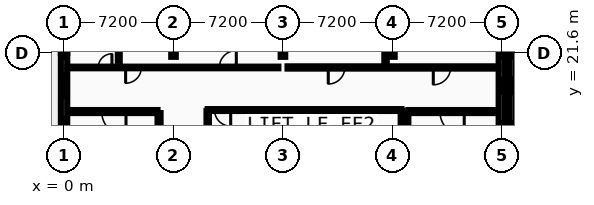
"""IFC4 building model, lengths in metres.
Left out: names, types, materials, properties, quantities, classifications, styles, units other than length and angle.
Written with IfcOpenShell. Run it as: python <this file> out.ifc"""

import sys

from ifc_helpers import new_model, si_unit, direction, frame, frame_2d, origin, origin_2d, place, context, subcontext, project, spatial, rectangle, i_section, extrude, element, fill, save


model = new_model("IFC4")
c1 = context("Model", 3, precision=1e-05, world=origin(), true_north=direction((0.0, 1.0)))
c2 = subcontext(c1, "Body", "Model", "MODEL_VIEW")
j1 = project(units=[si_unit("LENGTHUNIT", "METRE"), si_unit("PLANEANGLEUNIT", "RADIAN")], contexts=[c1])
p1 = place(None, origin())
s1 = spatial("IfcSite", under=j1, at=p1, CompositionType="ELEMENT")
p2 = place(p1, origin())
s2 = spatial("IfcBuilding", under=s1, at=p2, CompositionType="ELEMENT")
p3 = place(p2, origin())
s3 = spatial("IfcBuildingStorey", under=s2, at=p3, CompositionType="ELEMENT", Elevation=0.0)
for number, where, z_axis, x_axis in (
    (1, (0.0, 21.6, 0.0), (0.0, 0.0, 1.0), (1.0, 0.0, 0.0)),
    (2, (7.2, 21.6, 0.0), (0.0, 0.0, 1.0), (1.0, 0.0, 0.0)),
    (3, (14.4, 21.6, 0.0), (0.0, 0.0, 1.0), (1.0, 0.0, 0.0)),
    (4, (21.6, 21.6, 0.0), (0.0, 0.0, 1.0), (1.0, 0.0, 0.0)),
    (5, (28.8, 21.6, 0.0), (0.0, 0.0, 1.0), (1.0, 0.0, 0.0)),
):
    element("IfcColumn", number, at=place(p3, frame(where, z_axis=z_axis, x_axis=x_axis)), inside=s3, PredefinedType="COLUMN", context=c2, shape_type="SweptSolid", body=[
        extrude(i_section(OverallWidth=0.3, OverallDepth=0.5, WebThickness=0.014, FlangeThickness=0.028, FilletRadius=0.027, at=origin_2d()), origin(), (0.0, 0.0, 1.0), 5.2),
    ])
p4 = place(p3, frame((29.52, 21.6, 0.0), z_axis=(0.0, 0.0, 1.0), x_axis=(1.0, 0.0, 0.0)))
e6 = element("IfcColumn", 6, at=p4, inside=s3, PredefinedType="COLUMN", context=c2, shape_type="SweptSolid", body=[
    extrude(i_section(OverallWidth=0.3, OverallDepth=0.45, WebThickness=0.014, FlangeThickness=0.026, FilletRadius=0.027, at=origin_2d()), origin(), (0.0, 0.0, 1.0), 5.2),
])
p5 = place(p3, frame((0.0, 21.6, 0.0), z_axis=(0.0, 0.0, 1.0), x_axis=(0.0, -1.0, 0.0)))
e7 = element("IfcWall", 7, at=p5, inside=s3, PredefinedType="STANDARD", context=c2, shape_type="SweptSolid", body=[
    extrude(rectangle(XDim=7.15, YDim=0.42, at=frame_2d((3.575, 0.0))), origin(), (0.0, 0.0, 1.0), 4.97),
])
p6 = place(p5, frame((1.345, 0.0, 1.2)))
e8 = element("IfcOpeningElement", 8, at=p6, cuts=e7, PredefinedType="OPENING", context=c2, shape_type="SweptSolid", body=[
    extrude(rectangle(XDim=1.6, YDim=1.4, at=frame_2d((0.8, 0.7))), frame((0.0, 0.22, 0.0), z_axis=(0.0, -1.0, 0.0), x_axis=(1.0, 0.0, 0.0)), (0.0, 0.0, 1.0), 0.44),
])
p7 = place(p5, frame((4.205, 0.0, 1.2)))
e9 = element("IfcOpeningElement", 9, at=p7, cuts=e7, PredefinedType="OPENING", context=c2, shape_type="SweptSolid", body=[
    extrude(rectangle(XDim=1.6, YDim=1.4, at=frame_2d((0.8, 0.7))), frame((0.0, 0.22, 0.0), z_axis=(0.0, -1.0, 0.0), x_axis=(1.0, 0.0, 0.0)), (0.0, 0.0, 1.0), 0.44),
])
p8 = place(p3, frame((0.0, 28.8, 0.0), z_axis=(0.0, 0.0, 1.0), x_axis=(0.0, -1.0, 0.0)))
e10 = element("IfcWall", 10, at=p8, inside=s3, PredefinedType="STANDARD", context=c2, shape_type="SweptSolid", body=[
    extrude(rectangle(XDim=7.2, YDim=0.42, at=frame_2d((3.6, 0.0))), origin(), (0.0, 0.0, 1.0), 4.595),
])
p9 = place(p8, frame((2.5, 0.0, 0.95)))
e11 = element("IfcOpeningElement", 11, at=p9, cuts=e10, PredefinedType="OPENING", context=c2, shape_type="SweptSolid", body=[
    extrude(rectangle(XDim=2.2, YDim=1.75, at=frame_2d((1.1, 0.875))), frame((0.0, 0.22, 0.0), z_axis=(0.0, -1.0, 0.0), x_axis=(1.0, 0.0, 0.0)), (0.0, 0.0, 1.0), 0.44),
])
p10 = place(p3, frame((28.8, 14.45, 0.0), z_axis=(0.0, 0.0, 1.0), x_axis=(0.0, 1.0, 0.0)))
e12 = element("IfcWall", 12, at=p10, inside=s3, PredefinedType="STANDARD", context=c2, shape_type="SweptSolid", body=[
    extrude(rectangle(XDim=7.15, YDim=0.42, at=frame_2d((3.575, 0.0))), origin(), (0.0, 0.0, 1.0), 4.97),
])
p11 = place(p10, frame((1.647, 0.0, 0.95)))
e13 = element("IfcOpeningElement", 13, at=p11, cuts=e12, PredefinedType="OPENING", context=c2, shape_type="SweptSolid", body=[
    extrude(rectangle(XDim=0.996, YDim=1.26, at=frame_2d((0.498, 0.63))), frame((0.0, 0.22, 0.0), z_axis=(0.0, -1.0, 0.0), x_axis=(1.0, 0.0, 0.0)), (0.0, 0.0, 1.0), 0.44),
])
p12 = place(p10, frame((4.507, 0.0, 0.95)))
e14 = element("IfcOpeningElement", 14, at=p12, cuts=e12, PredefinedType="OPENING", context=c2, shape_type="SweptSolid", body=[
    extrude(rectangle(XDim=0.996, YDim=1.26, at=frame_2d((0.498, 0.63))), frame((0.0, 0.22, 0.0), z_axis=(0.0, -1.0, 0.0), x_axis=(1.0, 0.0, 0.0)), (0.0, 0.0, 1.0), 0.44),
])
p13 = place(p3, frame((29.52, 21.6, 0.0), z_axis=(0.0, 0.0, 1.0), x_axis=(0.0, -1.0, 0.0)))
e15 = element("IfcWall", 15, at=p13, inside=s3, PredefinedType="STANDARD", context=c2, shape_type="SweptSolid", body=[
    extrude(rectangle(XDim=7.2, YDim=0.42, at=frame_2d((3.6, 0.0))), origin(), (0.0, 0.0, 1.0), 4.665),
])
p14 = place(p13, frame((1.628, 0.0, 0.95)))
e16 = element("IfcOpeningElement", 16, at=p14, cuts=e15, PredefinedType="OPENING", context=c2, shape_type="SweptSolid", body=[
    extrude(rectangle(XDim=1.064, YDim=1.296, at=frame_2d((0.532, 0.648))), frame((0.0, 0.22, 0.0), z_axis=(0.0, -1.0, 0.0), x_axis=(1.0, 0.0, 0.0)), (0.0, 0.0, 1.0), 0.44),
])
p15 = place(p13, frame((4.508, 0.0, 0.95)))
e17 = element("IfcOpeningElement", 17, at=p15, cuts=e15, PredefinedType="OPENING", context=c2, shape_type="SweptSolid", body=[
    extrude(rectangle(XDim=1.064, YDim=1.296, at=frame_2d((0.532, 0.648))), frame((0.0, 0.22, 0.0), z_axis=(0.0, -1.0, 0.0), x_axis=(1.0, 0.0, 0.0)), (0.0, 0.0, 1.0), 0.44),
])
p16 = place(p3, frame((29.52, 29.01, 0.0), z_axis=(0.0, 0.0, 1.0), x_axis=(0.0, -1.0, 0.0)))
e18 = element("IfcWall", 18, at=p16, inside=s3, PredefinedType="STANDARD", context=c2, shape_type="SweptSolid", body=[
    extrude(rectangle(XDim=7.41, YDim=0.42, at=frame_2d((3.705, 0.0))), origin(), (0.0, 0.0, 1.0), 4.665),
])
p17 = place(p16, frame((1.674, 0.0, 0.95)))
e19 = element("IfcOpeningElement", 19, at=p17, cuts=e18, PredefinedType="OPENING", context=c2, shape_type="SweptSolid", body=[
    extrude(rectangle(XDim=1.098, YDim=1.296, at=frame_2d((0.549, 0.648))), frame((0.0, 0.22, 0.0), z_axis=(0.0, -1.0, 0.0), x_axis=(1.0, 0.0, 0.0)), (0.0, 0.0, 1.0), 0.44),
])
p18 = place(p16, frame((4.638, 0.0, 0.95)))
e20 = element("IfcOpeningElement", 20, at=p18, cuts=e18, PredefinedType="OPENING", context=c2, shape_type="SweptSolid", body=[
    extrude(rectangle(XDim=1.098, YDim=1.296, at=frame_2d((0.549, 0.648))), frame((0.0, 0.22, 0.0), z_axis=(0.0, -1.0, 0.0), x_axis=(1.0, 0.0, 0.0)), (0.0, 0.0, 1.0), 0.44),
])
p19 = place(p3, frame((0.4, 17.75, 0.0), z_axis=(0.0, 0.0, 1.0), x_axis=(1.0, 0.0, 0.0)))
e21 = element("IfcWall", 21, at=p19, inside=s3, PredefinedType="PARTITIONING", context=c2, shape_type="SweptSolid", body=[
    extrude(rectangle(XDim=5.75, YDim=0.2, at=frame_2d((2.875, 0.0))), origin(), (0.0, 0.0, 1.0), 4.97),
])
p20 = place(p19, frame((2.075, 0.0, 0.0)))
e22 = element("IfcOpeningElement", 22, at=p20, cuts=e21, PredefinedType="OPENING", context=c2, shape_type="SweptSolid", body=[
    extrude(rectangle(XDim=1.6, YDim=2.2, at=frame_2d((0.8, 1.1))), frame((0.0, 0.11, 0.0), z_axis=(0.0, -1.0, 0.0), x_axis=(1.0, 0.0, 0.0)), (0.0, 0.0, 1.0), 0.22),
])
p21 = place(p3, frame((6.25, 14.45, 0.0), z_axis=(0.0, 0.0, 1.0), x_axis=(0.0, 1.0, 0.0)))
e23 = element("IfcWall", 23, at=p21, inside=s3, PredefinedType="PARTITIONING", context=c2, shape_type="SweptSolid", body=[
    extrude(rectangle(XDim=3.2, YDim=0.2, at=frame_2d((1.6, 0.0))), origin(), (0.0, 0.0, 1.0), 4.97),
])
p22 = place(p3, frame((22.65, 17.75, 0.0), z_axis=(0.0, 0.0, 1.0), x_axis=(1.0, 0.0, 0.0)))
e24 = element("IfcWall", 24, at=p22, inside=s3, PredefinedType="PARTITIONING", context=c2, shape_type="SweptSolid", body=[
    extrude(rectangle(XDim=5.75, YDim=0.2, at=frame_2d((2.875, 0.0))), origin(), (0.0, 0.0, 1.0), 4.97),
])
p23 = place(p22, frame((2.075, 0.0, 0.0)))
e25 = element("IfcOpeningElement", 25, at=p23, cuts=e24, PredefinedType="OPENING", context=c2, shape_type="SweptSolid", body=[
    extrude(rectangle(XDim=1.6, YDim=2.2, at=frame_2d((0.8, 1.1))), frame((0.0, 0.11, 0.0), z_axis=(0.0, -1.0, 0.0), x_axis=(1.0, 0.0, 0.0)), (0.0, 0.0, 1.0), 0.22),
])
p24 = place(p3, frame((22.55, 14.45, 0.0), z_axis=(0.0, 0.0, 1.0), x_axis=(0.0, 1.0, 0.0)))
e26 = element("IfcWall", 26, at=p24, inside=s3, PredefinedType="PARTITIONING", context=c2, shape_type="SweptSolid", body=[
    extrude(rectangle(XDim=3.2, YDim=0.2, at=frame_2d((1.6, 0.0))), origin(), (0.0, 0.0, 1.0), 4.97),
])
p25 = place(p3, frame((9.45, 17.85, 0.0), z_axis=(0.0, 0.0, 1.0), x_axis=(1.0, 0.0, 0.0)))
e27 = element("IfcWall", 27, at=p25, inside=s3, PredefinedType="PARTITIONING", context=c2, shape_type="SweptSolid", body=[
    extrude(rectangle(XDim=12.75, YDim=0.125, at=frame_2d((6.375, 0.0))), origin(), (0.0, 0.0, 1.0), 4.97),
])
p26 = place(p25, frame((7.85, 0.0, 0.0)))
e28 = element("IfcOpeningElement", 28, at=p26, cuts=e27, PredefinedType="OPENING", context=c2, shape_type="SweptSolid", body=[
    extrude(rectangle(XDim=1.0, YDim=2.1, at=frame_2d((0.5, 1.05))), frame((0.0, 0.073, 0.0), z_axis=(0.0, -1.0, 0.0), x_axis=(1.0, 0.0, 0.0)), (0.0, 0.0, 1.0), 0.145),
])
p27 = place(p25, frame((0.45, 0.0, 0.0)))
e29 = element("IfcOpeningElement", 29, at=p27, cuts=e27, PredefinedType="OPENING", context=c2, shape_type="SweptSolid", body=[
    extrude(rectangle(XDim=1.062, YDim=2.068, at=frame_2d((0.531, 1.034))), frame((0.0, 0.073, 0.0), z_axis=(0.0, -1.0, 0.0), x_axis=(1.0, 0.0, 0.0)), (0.0, 0.0, 1.0), 0.145),
])
p28 = place(p3, frame((0.23, 20.65, 0.0), z_axis=(0.0, 0.0, 1.0), x_axis=(1.0, 0.0, 0.0)))
e30 = element("IfcWall", 30, at=p28, inside=s3, PredefinedType="PARTITIONING", context=c2, shape_type="SweptSolid", body=[
    extrude(rectangle(XDim=13.87, YDim=0.11, at=frame_2d((6.935, 0.0))), origin(), (0.0, 0.0, 1.0), 4.97),
])
p29 = place(p28, frame((2.02, 0.0, 0.0)))
e31 = element("IfcOpeningElement", 31, at=p29, cuts=e30, PredefinedType="OPENING", context=c2, shape_type="SweptSolid", body=[
    extrude(rectangle(XDim=0.9, YDim=2.1, at=frame_2d((0.45, 1.05))), frame((0.0, 0.065, 0.0), z_axis=(0.0, -1.0, 0.0), x_axis=(1.0, 0.0, 0.0)), (0.0, 0.0, 1.0), 0.13),
])
p30 = place(p28, frame((3.82, 0.0, 0.0)))
e32 = element("IfcOpeningElement", 32, at=p30, cuts=e30, PredefinedType="OPENING", context=c2, shape_type="SweptSolid", body=[
    extrude(rectangle(XDim=1.036, YDim=2.068, at=frame_2d((0.518, 1.034))), frame((0.0, 0.065, 0.0), z_axis=(0.0, -1.0, 0.0), x_axis=(1.0, 0.0, 0.0)), (0.0, 0.0, 1.0), 0.13),
])
p31 = place(p28, frame((9.988, 0.0, 0.0)))
e33 = element("IfcOpeningElement", 33, at=p31, cuts=e30, PredefinedType="OPENING", context=c2, shape_type="SweptSolid", body=[
    extrude(rectangle(XDim=1.114, YDim=2.068, at=frame_2d((0.557, 1.034))), frame((0.0, 0.065, 0.0), z_axis=(0.0, -1.0, 0.0), x_axis=(1.0, 0.0, 0.0)), (0.0, 0.0, 1.0), 0.13),
])
p32 = place(p3, frame((14.7, 20.65, 0.0), z_axis=(0.0, 0.0, 1.0), x_axis=(1.0, 0.0, 0.0)))
e34 = element("IfcWall", 34, at=p32, inside=s3, PredefinedType="PARTITIONING", context=c2, shape_type="SweptSolid", body=[
    extrude(rectangle(XDim=13.87, YDim=0.15, at=frame_2d((6.935, 0.0))), origin(), (0.0, 0.0, 1.0), 4.97),
])
p33 = place(p32, frame((2.681, 0.0, 0.0)))
e35 = element("IfcOpeningElement", 35, at=p33, cuts=e34, PredefinedType="OPENING", context=c2, shape_type="SweptSolid", body=[
    extrude(rectangle(XDim=1.088, YDim=2.068, at=frame_2d((0.544, 1.034))), frame((0.0, 0.085, 0.0), z_axis=(0.0, -1.0, 0.0), x_axis=(1.0, 0.0, 0.0)), (0.0, 0.0, 1.0), 0.17),
])
p34 = place(p32, frame((9.59, 0.0, 0.0)))
e36 = element("IfcOpeningElement", 36, at=p34, cuts=e34, PredefinedType="OPENING", context=c2, shape_type="SweptSolid", body=[
    extrude(rectangle(XDim=1.14, YDim=2.068, at=frame_2d((0.57, 1.034))), frame((0.0, 0.085, 0.0), z_axis=(0.0, -1.0, 0.0), x_axis=(1.0, 0.0, 0.0)), (0.0, 0.0, 1.0), 0.17),
])
p35 = place(p3, frame((3.6, 20.705, 0.0), z_axis=(0.0, 0.0, 1.0), x_axis=(0.0, 1.0, 0.0)))
e37 = element("IfcWall", 37, at=p35, inside=s3, PredefinedType="PARTITIONING", context=c2, shape_type="SweptSolid", body=[
    extrude(rectangle(XDim=29.485, YDim=0.125, at=frame_2d((14.742, 0.0))), origin(), (0.0, 0.0, 1.0), 4.97),
])
p36 = place(p3, frame((9.45, 3.36, 0.0), z_axis=(0.0, 0.0, 1.0), x_axis=(0.0, 1.0, 0.0)))
e38 = element("IfcWall", 38, at=p36, inside=s3, PredefinedType="PARTITIONING", context=c2, shape_type="SweptSolid", body=[
    extrude(rectangle(XDim=14.427, YDim=0.16, at=frame_2d((7.214, 0.0))), origin(), (0.0, 0.0, 1.0), 4.655),
])
p37 = place(p3, frame((16.85, 0.2, 0.0), z_axis=(0.0, 0.0, 1.0), x_axis=(0.0, 1.0, 0.0)))
e39 = element("IfcWall", 39, at=p37, inside=s3, PredefinedType="PARTITIONING", context=c2, shape_type="SweptSolid", body=[
    extrude(rectangle(XDim=17.588, YDim=0.11, at=frame_2d((8.794, 0.0))), origin(), (0.0, 0.0, 1.0), 4.655),
])
p38 = place(p3, frame((21.15, 20.725, 0.0), z_axis=(0.0, 0.0, 1.0), x_axis=(0.0, 1.0, 0.0)))
e40 = element("IfcWall", 40, at=p38, inside=s3, PredefinedType="PARTITIONING", context=c2, shape_type="SweptSolid", body=[
    extrude(rectangle(XDim=29.404, YDim=0.16, at=frame_2d((14.702, 0.0))), origin(), (0.0, 0.0, 1.0), 4.97),
])
p39 = place(p3, frame((22.2, 14.65, 0.0), z_axis=(0.0, 0.0, 1.0), x_axis=(0.0, 1.0, 0.0)))
e41 = element("IfcWall", 41, at=p39, inside=s3, PredefinedType="PARTITIONING", context=c2, shape_type="SweptSolid", body=[
    extrude(rectangle(XDim=3.138, YDim=0.11, at=frame_2d((1.569, 0.0))), origin(), (0.0, 0.0, 1.0), 4.97),
])
p40 = place(p6, origin())
e42 = element("IfcWindow", 42, at=p40, inside=s3, PartitioningType="SINGLE_PANEL", PredefinedType="WINDOW", context=c2, shape_type="SweptSolid", body=[
    extrude(rectangle(XDim=1.6, YDim=1.4, at=frame_2d((0.8, 0.7))), frame((0.0, 0.03, 0.0), z_axis=(0.0, -1.0, 0.0), x_axis=(1.0, 0.0, 0.0)), (0.0, 0.0, 1.0), 0.06),
])
fill(e8, e42)
p41 = place(p7, origin())
e43 = element("IfcWindow", 43, at=p41, inside=s3, PartitioningType="SINGLE_PANEL", PredefinedType="WINDOW", context=c2, shape_type="SweptSolid", body=[
    extrude(rectangle(XDim=1.6, YDim=1.4, at=frame_2d((0.8, 0.7))), frame((0.0, 0.03, 0.0), z_axis=(0.0, -1.0, 0.0), x_axis=(1.0, 0.0, 0.0)), (0.0, 0.0, 1.0), 0.06),
])
fill(e9, e43)
p42 = place(p11, origin())
e44 = element("IfcWindow", 44, at=p42, inside=s3, PartitioningType="SINGLE_PANEL", PredefinedType="WINDOW", context=c2, shape_type="SweptSolid", body=[
    extrude(rectangle(XDim=0.996, YDim=1.26, at=frame_2d((0.498, 0.63))), frame((0.0, 0.03, 0.0), z_axis=(0.0, -1.0, 0.0), x_axis=(1.0, 0.0, 0.0)), (0.0, 0.0, 1.0), 0.06),
])
fill(e13, e44)
p43 = place(p12, origin())
e45 = element("IfcWindow", 45, at=p43, inside=s3, PartitioningType="SINGLE_PANEL", PredefinedType="WINDOW", context=c2, shape_type="SweptSolid", body=[
    extrude(rectangle(XDim=0.996, YDim=1.26, at=frame_2d((0.498, 0.63))), frame((0.0, 0.03, 0.0), z_axis=(0.0, -1.0, 0.0), x_axis=(1.0, 0.0, 0.0)), (0.0, 0.0, 1.0), 0.06),
])
fill(e14, e45)
p44 = place(p14, origin())
e46 = element("IfcWindow", 46, at=p44, inside=s3, PartitioningType="SINGLE_PANEL", PredefinedType="WINDOW", context=c2, shape_type="SweptSolid", body=[
    extrude(rectangle(XDim=1.064, YDim=1.296, at=frame_2d((0.532, 0.648))), frame((0.0, 0.03, 0.0), z_axis=(0.0, -1.0, 0.0), x_axis=(1.0, 0.0, 0.0)), (0.0, 0.0, 1.0), 0.06),
])
fill(e16, e46)
p45 = place(p15, origin())
e47 = element("IfcWindow", 47, at=p45, inside=s3, PartitioningType="SINGLE_PANEL", PredefinedType="WINDOW", context=c2, shape_type="SweptSolid", body=[
    extrude(rectangle(XDim=1.064, YDim=1.296, at=frame_2d((0.532, 0.648))), frame((0.0, 0.03, 0.0), z_axis=(0.0, -1.0, 0.0), x_axis=(1.0, 0.0, 0.0)), (0.0, 0.0, 1.0), 0.06),
])
fill(e17, e47)
p46 = place(p20, origin())
e48 = element("IfcDoor", 48, at=p46, inside=s3, OperationType="DOUBLE_DOOR_SINGLE_SWING", PredefinedType="DOOR", context=c2, shape_type="SweptSolid", body=[
    extrude(rectangle(XDim=1.6, YDim=2.2, at=frame_2d((0.8, 1.1))), frame((0.0, 0.025, 0.0), z_axis=(0.0, -1.0, 0.0), x_axis=(1.0, 0.0, 0.0)), (0.0, 0.0, 1.0), 0.05),
])
fill(e22, e48)
p47 = place(p23, origin())
e49 = element("IfcDoor", 49, at=p47, inside=s3, OperationType="DOUBLE_DOOR_SINGLE_SWING", PredefinedType="DOOR", context=c2, shape_type="SweptSolid", body=[
    extrude(rectangle(XDim=1.6, YDim=2.2, at=frame_2d((0.8, 1.1))), frame((0.0, 0.025, 0.0), z_axis=(0.0, -1.0, 0.0), x_axis=(1.0, 0.0, 0.0)), (0.0, 0.0, 1.0), 0.05),
])
fill(e25, e49)
p48 = place(p26, origin())
e50 = element("IfcDoor", 50, at=p48, inside=s3, OperationType="SLIDING_TO_LEFT", PredefinedType="DOOR", context=c2, shape_type="SweptSolid", body=[
    extrude(rectangle(XDim=1.0, YDim=2.1, at=frame_2d((0.5, 1.05))), frame((0.0, 0.025, 0.0), z_axis=(0.0, -1.0, 0.0), x_axis=(1.0, 0.0, 0.0)), (0.0, 0.0, 1.0), 0.05),
])
fill(e28, e50)
p49 = place(p29, frame((0.9, 0.0, 0.0), z_axis=(0.0, 0.0, 1.0), x_axis=(-1.0, 0.0, 0.0)))
e51 = element("IfcDoor", 51, at=p49, inside=s3, OperationType="SINGLE_SWING_RIGHT", PredefinedType="DOOR", context=c2, shape_type="SweptSolid", body=[
    extrude(rectangle(XDim=0.9, YDim=2.1, at=frame_2d((0.45, 1.05))), frame((0.0, 0.025, 0.0), z_axis=(0.0, -1.0, 0.0), x_axis=(1.0, 0.0, 0.0)), (0.0, 0.0, 1.0), 0.05),
])
fill(e31, e51)
p50 = place(p30, frame((1.036, 0.0, 0.0), z_axis=(0.0, 0.0, 1.0), x_axis=(-1.0, 0.0, 0.0)))
e52 = element("IfcDoor", 52, at=p50, inside=s3, OperationType="SINGLE_SWING_LEFT", PredefinedType="DOOR", context=c2, shape_type="SweptSolid", body=[
    extrude(rectangle(XDim=1.036, YDim=2.068, at=frame_2d((0.518, 1.034))), frame((0.0, 0.025, 0.0), z_axis=(0.0, -1.0, 0.0), x_axis=(1.0, 0.0, 0.0)), (0.0, 0.0, 1.0), 0.05),
])
fill(e32, e52)
p51 = place(p27, origin())
e53 = element("IfcDoor", 53, at=p51, inside=s3, OperationType="SINGLE_SWING_RIGHT", PredefinedType="DOOR", context=c2, shape_type="SweptSolid", body=[
    extrude(rectangle(XDim=1.062, YDim=2.068, at=frame_2d((0.531, 1.034))), frame((0.0, 0.025, 0.0), z_axis=(0.0, -1.0, 0.0), x_axis=(1.0, 0.0, 0.0)), (0.0, 0.0, 1.0), 0.05),
])
fill(e29, e53)
p52 = place(p33, frame((1.088, 0.0, 0.0), z_axis=(0.0, 0.0, 1.0), x_axis=(-1.0, 0.0, 0.0)))
e54 = element("IfcDoor", 54, at=p52, inside=s3, OperationType="SINGLE_SWING_LEFT", PredefinedType="DOOR", context=c2, shape_type="SweptSolid", body=[
    extrude(rectangle(XDim=1.088, YDim=2.068, at=frame_2d((0.544, 1.034))), frame((0.0, 0.025, 0.0), z_axis=(0.0, -1.0, 0.0), x_axis=(1.0, 0.0, 0.0)), (0.0, 0.0, 1.0), 0.05),
])
fill(e35, e54)
p53 = place(p31, frame((1.114, 0.0, 0.0), z_axis=(0.0, 0.0, 1.0), x_axis=(-1.0, 0.0, 0.0)))
e55 = element("IfcDoor", 55, at=p53, inside=s3, OperationType="SINGLE_SWING_RIGHT", PredefinedType="DOOR", context=c2, shape_type="SweptSolid", body=[
    extrude(rectangle(XDim=1.114, YDim=2.068, at=frame_2d((0.557, 1.034))), frame((0.0, 0.025, 0.0), z_axis=(0.0, -1.0, 0.0), x_axis=(1.0, 0.0, 0.0)), (0.0, 0.0, 1.0), 0.05),
])
fill(e33, e55)
p54 = place(p34, frame((1.14, 0.0, 0.0), z_axis=(0.0, 0.0, 1.0), x_axis=(-1.0, 0.0, 0.0)))
e56 = element("IfcDoor", 56, at=p54, inside=s3, OperationType="SINGLE_SWING_LEFT", PredefinedType="DOOR", context=c2, shape_type="SweptSolid", body=[
    extrude(rectangle(XDim=1.14, YDim=2.068, at=frame_2d((0.57, 1.034))), frame((0.0, 0.025, 0.0), z_axis=(0.0, -1.0, 0.0), x_axis=(1.0, 0.0, 0.0)), (0.0, 0.0, 1.0), 0.05),
])
fill(e36, e56)
save(model, sys.argv[1])
